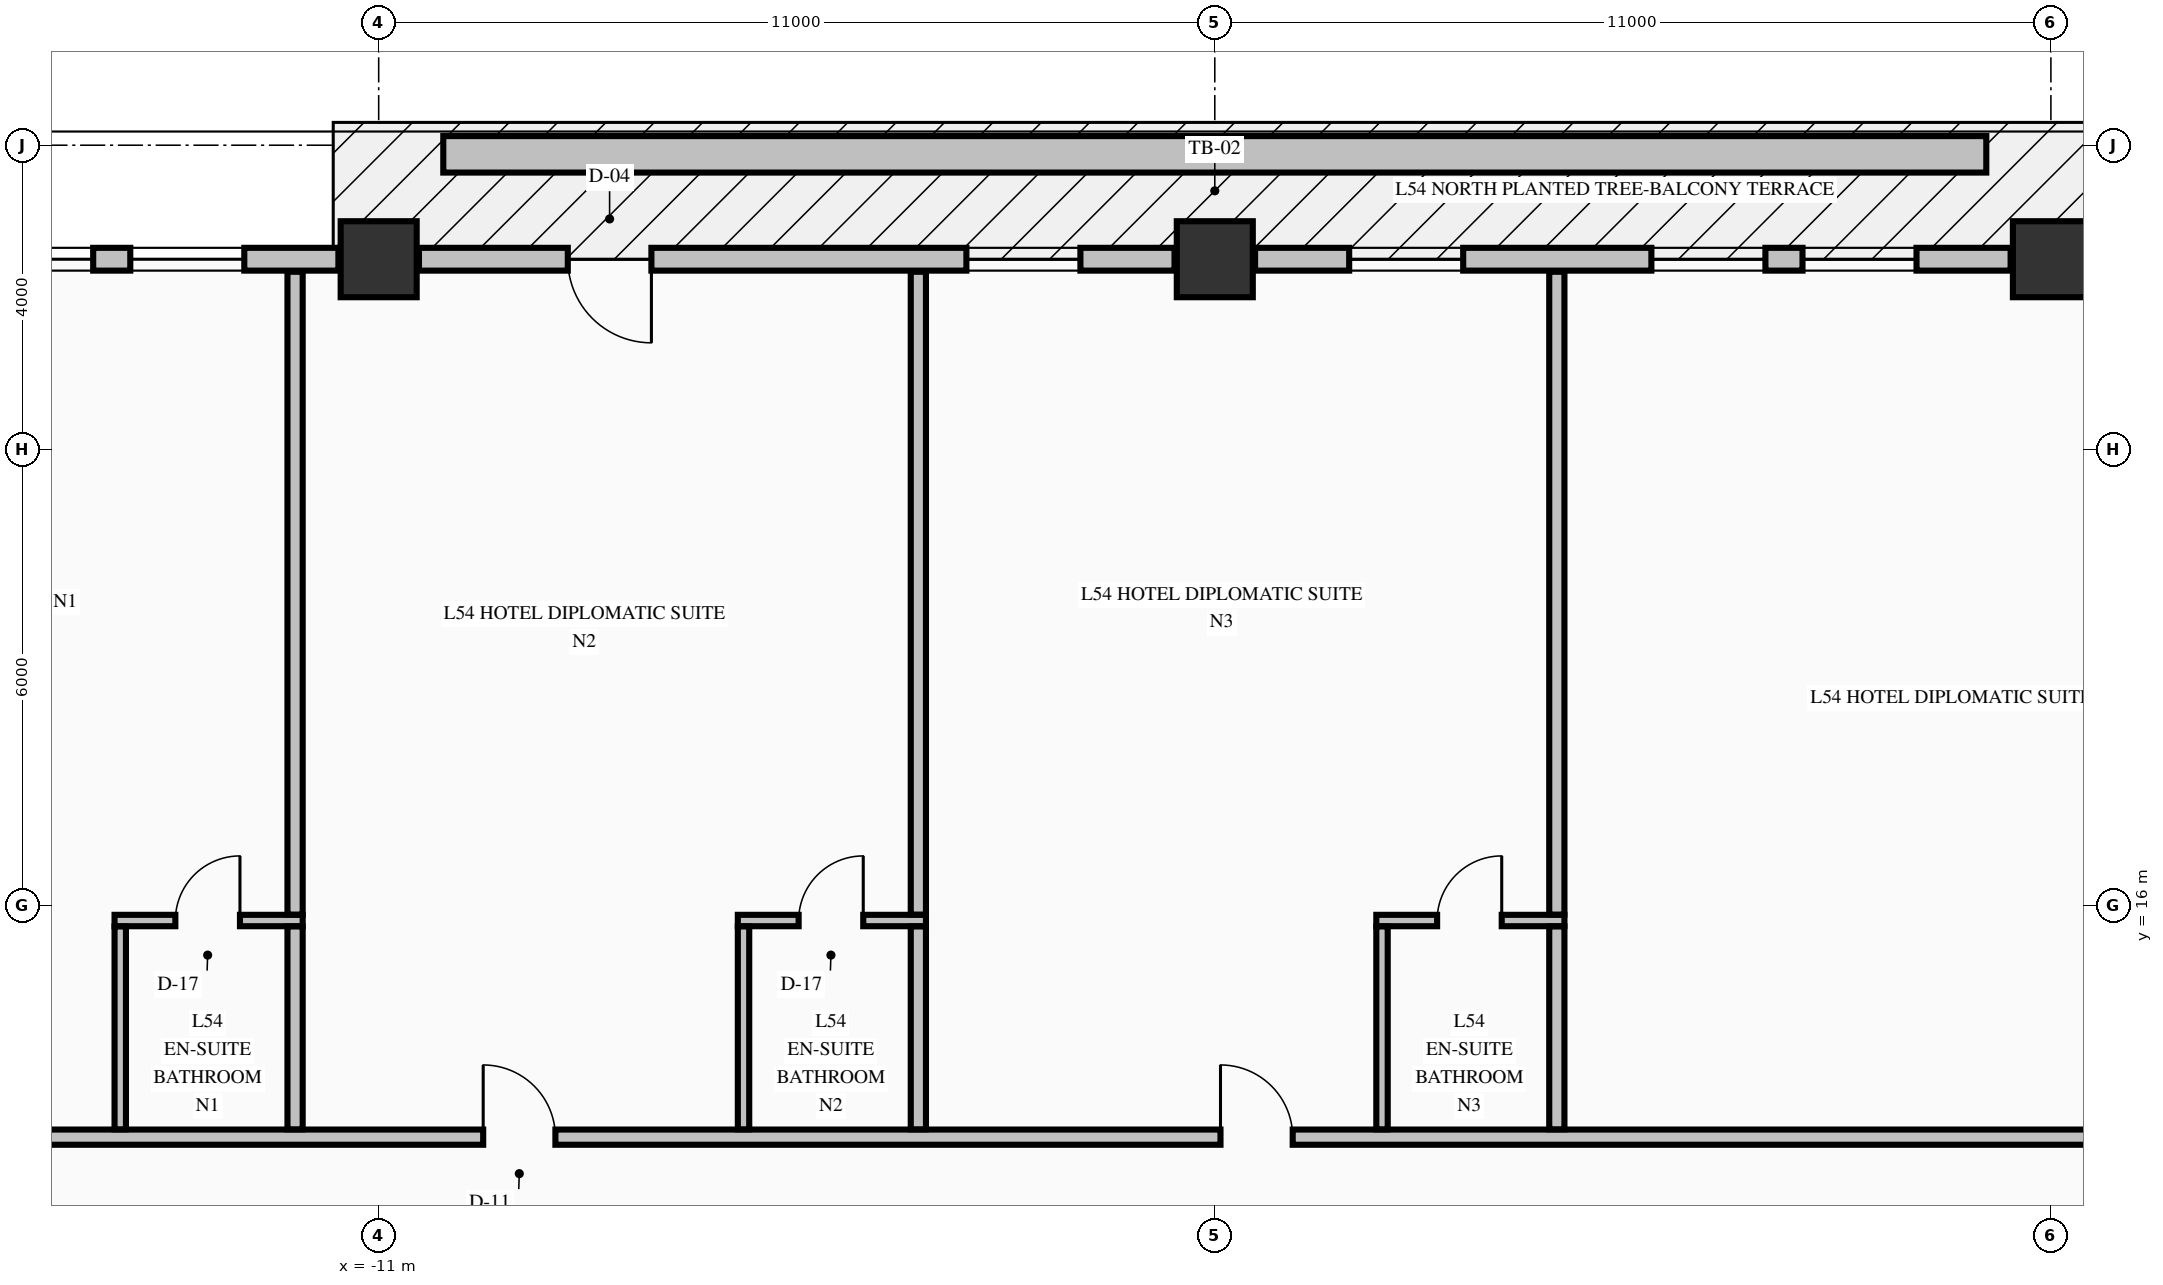
"""IFC4 building model, lengths in metres.
Left out: names, types, materials, properties, quantities, classifications, styles, units other than length and angle.
Written with IfcOpenShell. Run it as: python <this file> out.ifc"""

import sys

from ifc_helpers import new_model, si_unit, direction, frame, frame_2d, origin, origin_2d, place, context, subcontext, project, spatial, rectangle, extrude, element, fill, save


model = new_model("IFC4")
c1 = context("Model", 3, precision=1e-05, world=origin(), true_north=direction((0.0, 1.0)))
c2 = subcontext(c1, "Body", "Model", "MODEL_VIEW")
j1 = project(units=[si_unit("LENGTHUNIT", "METRE"), si_unit("PLANEANGLEUNIT", "RADIAN")], contexts=[c1])
p1 = place(None, origin())
s1 = spatial("IfcSite", under=j1, at=p1, CompositionType="ELEMENT")
p2 = place(p1, origin())
s2 = spatial("IfcBuilding", under=s1, at=p2, CompositionType="ELEMENT")
p3 = place(p2, frame((0.0, 0.0, 208.46)))
s3 = spatial("IfcBuildingStorey", under=s2, at=p3, CompositionType="ELEMENT", Elevation=208.46)
for number, where, z_axis, x_axis in (
    (1, (-11.0, 24.5, -0.25), (0.0, 0.0, 1.0), (1.0, 0.0, 0.0)),
    (2, (0.0, 24.5, -0.25), (0.0, 0.0, 1.0), (1.0, 0.0, 0.0)),
    (3, (11.0, 24.5, -0.25), (0.0, 0.0, 1.0), (1.0, 0.0, 0.0)),
):
    element("IfcColumn", number, at=place(p3, frame(where, z_axis=z_axis, x_axis=x_axis)), inside=s3, PredefinedType="COLUMN", context=c2, shape_type="SweptSolid", body=[
        extrude(rectangle(XDim=1.0, YDim=1.0, at=origin_2d()), origin(), (0.0, 0.0, 1.0), 3.325),
    ])
p4 = place(p3, frame((-11.53, 24.5, 0.0), z_axis=(0.0, 0.0, 1.0), x_axis=(-1.0, 0.0, 0.0)))
e4 = element("IfcWall", 4, at=p4, inside=s3, PredefinedType="STANDARD", context=c2, shape_type="SweptSolid", body=[
    extrude(rectangle(XDim=9.94, YDim=0.3, at=frame_2d((4.97, 0.0))), origin(), (0.0, 0.0, 1.0), 2.467),
])
p5 = place(p4, frame((1.238, 0.0, 0.72)))
e5 = element("IfcOpeningElement", 5, at=p5, cuts=e4, PredefinedType="OPENING", context=c2, shape_type="SweptSolid", body=[
    extrude(rectangle(XDim=1.5, YDim=1.6, at=frame_2d((0.75, 0.8))), frame((0.0, 0.16, 0.0), z_axis=(0.0, -1.0, 0.0), x_axis=(1.0, 0.0, 0.0)), (0.0, 0.0, 1.0), 0.32),
])
p6 = place(p4, frame((3.226, 0.0, 0.72)))
e6 = element("IfcOpeningElement", 6, at=p6, cuts=e4, PredefinedType="OPENING", context=c2, shape_type="SweptSolid", body=[
    extrude(rectangle(XDim=1.5, YDim=1.6, at=frame_2d((0.75, 0.8))), frame((0.0, 0.16, 0.0), z_axis=(0.0, -1.0, 0.0), x_axis=(1.0, 0.0, 0.0)), (0.0, 0.0, 1.0), 0.32),
])
p7 = place(p4, frame((5.214, 0.0, 0.72)))
e7 = element("IfcOpeningElement", 7, at=p7, cuts=e4, PredefinedType="OPENING", context=c2, shape_type="SweptSolid", body=[
    extrude(rectangle(XDim=1.5, YDim=1.6, at=frame_2d((0.75, 0.8))), frame((0.0, 0.16, 0.0), z_axis=(0.0, -1.0, 0.0), x_axis=(1.0, 0.0, 0.0)), (0.0, 0.0, 1.0), 0.32),
])
p8 = place(p3, frame((-0.53, 24.5, 0.0), z_axis=(0.0, 0.0, 1.0), x_axis=(-1.0, 0.0, 0.0)))
e8 = element("IfcWall", 8, at=p8, inside=s3, PredefinedType="STANDARD", context=c2, shape_type="SweptSolid", body=[
    extrude(rectangle(XDim=9.94, YDim=0.3, at=frame_2d((4.97, 0.0))), origin(), (0.0, 0.0, 1.0), 2.467),
])
p9 = place(p8, frame((6.882, 0.0, 0.0)))
e9 = element("IfcOpeningElement", 9, at=p9, cuts=e8, PredefinedType="OPENING", context=c2, shape_type="SweptSolid", body=[
    extrude(rectangle(XDim=1.1, YDim=2.15, at=frame_2d((0.55, 1.075))), frame((0.0, 0.16, 0.0), z_axis=(0.0, -1.0, 0.0), x_axis=(1.0, 0.0, 0.0)), (0.0, 0.0, 1.0), 0.32),
])
p10 = place(p8, frame((1.238, 0.0, 0.72)))
e10 = element("IfcOpeningElement", 10, at=p10, cuts=e8, PredefinedType="OPENING", context=c2, shape_type="SweptSolid", body=[
    extrude(rectangle(XDim=1.5, YDim=1.6, at=frame_2d((0.75, 0.8))), frame((0.0, 0.16, 0.0), z_axis=(0.0, -1.0, 0.0), x_axis=(1.0, 0.0, 0.0)), (0.0, 0.0, 1.0), 0.32),
])
p11 = place(p3, frame((10.47, 24.5, 0.0), z_axis=(0.0, 0.0, 1.0), x_axis=(-1.0, 0.0, 0.0)))
e11 = element("IfcWall", 11, at=p11, inside=s3, PredefinedType="STANDARD", context=c2, shape_type="SweptSolid", body=[
    extrude(rectangle(XDim=9.94, YDim=0.3, at=frame_2d((4.97, 0.0))), origin(), (0.0, 0.0, 1.0), 2.467),
])
p12 = place(p11, frame((1.238, 0.0, 0.72)))
e12 = element("IfcOpeningElement", 12, at=p12, cuts=e11, PredefinedType="OPENING", context=c2, shape_type="SweptSolid", body=[
    extrude(rectangle(XDim=1.5, YDim=1.6, at=frame_2d((0.75, 0.8))), frame((0.0, 0.16, 0.0), z_axis=(0.0, -1.0, 0.0), x_axis=(1.0, 0.0, 0.0)), (0.0, 0.0, 1.0), 0.32),
])
p13 = place(p11, frame((3.226, 0.0, 0.72)))
e13 = element("IfcOpeningElement", 13, at=p13, cuts=e11, PredefinedType="OPENING", context=c2, shape_type="SweptSolid", body=[
    extrude(rectangle(XDim=1.5, YDim=1.6, at=frame_2d((0.75, 0.8))), frame((0.0, 0.16, 0.0), z_axis=(0.0, -1.0, 0.0), x_axis=(1.0, 0.0, 0.0)), (0.0, 0.0, 1.0), 0.32),
])
p14 = place(p11, frame((7.202, 0.0, 0.72)))
e14 = element("IfcOpeningElement", 14, at=p14, cuts=e11, PredefinedType="OPENING", context=c2, shape_type="SweptSolid", body=[
    extrude(rectangle(XDim=1.5, YDim=1.6, at=frame_2d((0.75, 0.8))), frame((0.0, 0.16, 0.0), z_axis=(0.0, -1.0, 0.0), x_axis=(1.0, 0.0, 0.0)), (0.0, 0.0, 1.0), 0.32),
])
p15 = place(p3, frame((-22.1, 12.95, 0.0), z_axis=(0.0, 0.0, 1.0), x_axis=(1.0, 0.0, 0.0)))
e15 = element("IfcWall", 15, at=p15, inside=s3, PredefinedType="PARTITIONING", context=c2, shape_type="SweptSolid", body=[
    extrude(rectangle(XDim=39.2, YDim=0.2, at=frame_2d((19.6, 0.0))), origin(), (0.0, 0.0, 1.0), 3.075),
])
p16 = place(p15, frame((4.525, 0.0, 0.0)))
e16 = element("IfcOpeningElement", 16, at=p16, cuts=e15, PredefinedType="OPENING", context=c2, shape_type="SweptSolid", body=[
    extrude(rectangle(XDim=0.95, YDim=2.15, at=frame_2d((0.475, 1.075))), frame((0.0, 0.11, 0.0), z_axis=(0.0, -1.0, 0.0), x_axis=(1.0, 0.0, 0.0)), (0.0, 0.0, 1.0), 0.22),
])
p17 = place(p15, frame((12.475, 0.0, 0.0)))
e17 = element("IfcOpeningElement", 17, at=p17, cuts=e15, PredefinedType="OPENING", context=c2, shape_type="SweptSolid", body=[
    extrude(rectangle(XDim=0.95, YDim=2.15, at=frame_2d((0.475, 1.075))), frame((0.0, 0.11, 0.0), z_axis=(0.0, -1.0, 0.0), x_axis=(1.0, 0.0, 0.0)), (0.0, 0.0, 1.0), 0.22),
])
p18 = place(p15, frame((22.175, 0.0, 0.0)))
e18 = element("IfcOpeningElement", 18, at=p18, cuts=e15, PredefinedType="OPENING", context=c2, shape_type="SweptSolid", body=[
    extrude(rectangle(XDim=0.95, YDim=2.15, at=frame_2d((0.475, 1.075))), frame((0.0, 0.11, 0.0), z_axis=(0.0, -1.0, 0.0), x_axis=(1.0, 0.0, 0.0)), (0.0, 0.0, 1.0), 0.22),
])
p19 = place(p15, frame((34.675, 0.0, 0.0)))
e19 = element("IfcOpeningElement", 19, at=p19, cuts=e15, PredefinedType="OPENING", context=c2, shape_type="SweptSolid", body=[
    extrude(rectangle(XDim=0.95, YDim=2.15, at=frame_2d((0.475, 1.075))), frame((0.0, 0.11, 0.0), z_axis=(0.0, -1.0, 0.0), x_axis=(1.0, 0.0, 0.0)), (0.0, 0.0, 1.0), 0.22),
])
p20 = place(p3, frame((-14.475, 15.8, 0.0), z_axis=(0.0, 0.0, 1.0), x_axis=(1.0, 0.0, 0.0)))
e20 = element("IfcWall", 20, at=p20, inside=s3, PredefinedType="PARTITIONING", context=c2, shape_type="SweptSolid", body=[
    extrude(rectangle(XDim=2.475, YDim=0.15, at=frame_2d((1.238, 0.0))), origin(), (0.0, 0.0, 1.0), 3.075),
])
p21 = place(p20, frame((0.8, 0.0, 0.0)))
e21 = element("IfcOpeningElement", 21, at=p21, cuts=e20, PredefinedType="OPENING", context=c2, shape_type="SweptSolid", body=[
    extrude(rectangle(XDim=0.85, YDim=2.1, at=frame_2d((0.425, 1.05))), frame((0.0, 0.085, 0.0), z_axis=(0.0, -1.0, 0.0), x_axis=(1.0, 0.0, 0.0)), (0.0, 0.0, 1.0), 0.17),
])
p22 = place(p3, frame((-6.275, 15.8, 0.0), z_axis=(0.0, 0.0, 1.0), x_axis=(1.0, 0.0, 0.0)))
e22 = element("IfcWall", 22, at=p22, inside=s3, PredefinedType="PARTITIONING", context=c2, shape_type="SweptSolid", body=[
    extrude(rectangle(XDim=2.475, YDim=0.15, at=frame_2d((1.237, 0.0))), origin(), (0.0, 0.0, 1.0), 3.075),
])
p23 = place(p22, frame((0.8, 0.0, 0.0)))
e23 = element("IfcOpeningElement", 23, at=p23, cuts=e22, PredefinedType="OPENING", context=c2, shape_type="SweptSolid", body=[
    extrude(rectangle(XDim=0.85, YDim=2.1, at=frame_2d((0.425, 1.05))), frame((0.0, 0.085, 0.0), z_axis=(0.0, -1.0, 0.0), x_axis=(1.0, 0.0, 0.0)), (0.0, 0.0, 1.0), 0.17),
])
p24 = place(p3, frame((2.125, 15.8, 0.0), z_axis=(0.0, 0.0, 1.0), x_axis=(1.0, 0.0, 0.0)))
e24 = element("IfcWall", 24, at=p24, inside=s3, PredefinedType="PARTITIONING", context=c2, shape_type="SweptSolid", body=[
    extrude(rectangle(XDim=2.475, YDim=0.15, at=frame_2d((1.238, 0.0))), origin(), (0.0, 0.0, 1.0), 3.075),
])
p25 = place(p24, frame((0.8, 0.0, 0.0)))
e25 = element("IfcOpeningElement", 25, at=p25, cuts=e24, PredefinedType="OPENING", context=c2, shape_type="SweptSolid", body=[
    extrude(rectangle(XDim=0.85, YDim=2.1, at=frame_2d((0.425, 1.05))), frame((0.0, 0.085, 0.0), z_axis=(0.0, -1.0, 0.0), x_axis=(1.0, 0.0, 0.0)), (0.0, 0.0, 1.0), 0.17),
])
p26 = place(p3, frame((-14.4, 13.053, 0.0), z_axis=(0.0, 0.0, 1.0), x_axis=(0.0, 1.0, 0.0)))
e26 = element("IfcWall", 26, at=p26, inside=s3, PredefinedType="PARTITIONING", context=c2, shape_type="SweptSolid", body=[
    extrude(rectangle(XDim=2.669, YDim=0.15, at=frame_2d((1.334, 0.0))), origin(), (0.0, 0.0, 1.0), 3.075),
])
p27 = place(p3, frame((-12.1, 13.053, 0.0), z_axis=(0.0, 0.0, 1.0), x_axis=(0.0, 1.0, 0.0)))
e27 = element("IfcWall", 27, at=p27, inside=s3, PredefinedType="PARTITIONING", context=c2, shape_type="SweptSolid", body=[
    extrude(rectangle(XDim=2.669, YDim=0.2, at=frame_2d((1.334, 0.0))), origin(), (0.0, 0.0, 1.0), 3.075),
])
p28 = place(p3, frame((-12.1, 15.878, 0.0), z_axis=(0.0, 0.0, 1.0), x_axis=(0.0, 1.0, 0.0)))
e28 = element("IfcWall", 28, at=p28, inside=s3, PredefinedType="PARTITIONING", context=c2, shape_type="SweptSolid", body=[
    extrude(rectangle(XDim=8.457, YDim=0.2, at=frame_2d((4.229, 0.0))), origin(), (0.0, 0.0, 1.0), 3.075),
])
p29 = place(p3, frame((-6.2, 13.053, 0.0), z_axis=(0.0, 0.0, 1.0), x_axis=(0.0, 1.0, 0.0)))
e29 = element("IfcWall", 29, at=p29, inside=s3, PredefinedType="PARTITIONING", context=c2, shape_type="SweptSolid", body=[
    extrude(rectangle(XDim=2.669, YDim=0.15, at=frame_2d((1.334, 0.0))), origin(), (0.0, 0.0, 1.0), 3.075),
])
p30 = place(p3, frame((-3.9, 13.053, 0.0), z_axis=(0.0, 0.0, 1.0), x_axis=(0.0, 1.0, 0.0)))
e30 = element("IfcWall", 30, at=p30, inside=s3, PredefinedType="PARTITIONING", context=c2, shape_type="SweptSolid", body=[
    extrude(rectangle(XDim=2.669, YDim=0.2, at=frame_2d((1.334, 0.0))), origin(), (0.0, 0.0, 1.0), 3.075),
])
p31 = place(p3, frame((-3.9, 15.878, 0.0), z_axis=(0.0, 0.0, 1.0), x_axis=(0.0, 1.0, 0.0)))
e31 = element("IfcWall", 31, at=p31, inside=s3, PredefinedType="PARTITIONING", context=c2, shape_type="SweptSolid", body=[
    extrude(rectangle(XDim=8.457, YDim=0.2, at=frame_2d((4.229, 0.0))), origin(), (0.0, 0.0, 1.0), 3.075),
])
p32 = place(p3, frame((2.2, 13.053, 0.0), z_axis=(0.0, 0.0, 1.0), x_axis=(0.0, 1.0, 0.0)))
e32 = element("IfcWall", 32, at=p32, inside=s3, PredefinedType="PARTITIONING", context=c2, shape_type="SweptSolid", body=[
    extrude(rectangle(XDim=2.669, YDim=0.15, at=frame_2d((1.334, 0.0))), origin(), (0.0, 0.0, 1.0), 3.075),
])
p33 = place(p3, frame((4.5, 13.053, 0.0), z_axis=(0.0, 0.0, 1.0), x_axis=(0.0, 1.0, 0.0)))
e33 = element("IfcWall", 33, at=p33, inside=s3, PredefinedType="PARTITIONING", context=c2, shape_type="SweptSolid", body=[
    extrude(rectangle(XDim=2.669, YDim=0.2, at=frame_2d((1.334, 0.0))), origin(), (0.0, 0.0, 1.0), 3.075),
])
p34 = place(p3, frame((4.5, 15.878, 0.0), z_axis=(0.0, 0.0, 1.0), x_axis=(0.0, 1.0, 0.0)))
e34 = element("IfcWall", 34, at=p34, inside=s3, PredefinedType="PARTITIONING", context=c2, shape_type="SweptSolid", body=[
    extrude(rectangle(XDim=8.457, YDim=0.2, at=frame_2d((4.229, 0.0))), origin(), (0.0, 0.0, 1.0), 3.075),
])
p35 = place(p3, frame((-10.15, 25.88, -0.04), z_axis=(0.0, 0.0, 1.0), x_axis=(1.0, 0.0, 0.0)))
e35 = element("IfcWall", 35, at=p35, inside=s3, PredefinedType="PARAPET", context=c2, shape_type="SweptSolid", body=[
    extrude(rectangle(XDim=20.3, YDim=0.48, at=frame_2d((10.15, 0.0))), origin(), (0.0, 0.0, 1.0), 0.52),
])
p36 = place(p5, origin())
e36 = element("IfcWindow", 36, at=p36, inside=s3, PartitioningType="SINGLE_PANEL", PredefinedType="WINDOW", context=c2, shape_type="SweptSolid", body=[
    extrude(rectangle(XDim=1.5, YDim=1.6, at=frame_2d((0.75, 0.8))), frame((0.0, 0.03, 0.0), z_axis=(0.0, -1.0, 0.0), x_axis=(1.0, 0.0, 0.0)), (0.0, 0.0, 1.0), 0.06),
])
fill(e5, e36)
p37 = place(p6, origin())
e37 = element("IfcWindow", 37, at=p37, inside=s3, PartitioningType="SINGLE_PANEL", PredefinedType="WINDOW", context=c2, shape_type="SweptSolid", body=[
    extrude(rectangle(XDim=1.5, YDim=1.6, at=frame_2d((0.75, 0.8))), frame((0.0, 0.03, 0.0), z_axis=(0.0, -1.0, 0.0), x_axis=(1.0, 0.0, 0.0)), (0.0, 0.0, 1.0), 0.06),
])
fill(e6, e37)
p38 = place(p9, origin())
e38 = element("IfcDoor", 38, at=p38, inside=s3, OperationType="SINGLE_SWING_LEFT", PredefinedType="DOOR", context=c2, shape_type="SweptSolid", body=[
    extrude(rectangle(XDim=1.1, YDim=2.15, at=frame_2d((0.55, 1.075))), frame((0.0, 0.025, 0.0), z_axis=(0.0, -1.0, 0.0), x_axis=(1.0, 0.0, 0.0)), (0.0, 0.0, 1.0), 0.05),
])
fill(e9, e38)
p39 = place(p10, origin())
e39 = element("IfcWindow", 39, at=p39, inside=s3, PartitioningType="SINGLE_PANEL", PredefinedType="WINDOW", context=c2, shape_type="SweptSolid", body=[
    extrude(rectangle(XDim=1.5, YDim=1.6, at=frame_2d((0.75, 0.8))), frame((0.0, 0.03, 0.0), z_axis=(0.0, -1.0, 0.0), x_axis=(1.0, 0.0, 0.0)), (0.0, 0.0, 1.0), 0.06),
])
fill(e10, e39)
p40 = place(p12, origin())
e40 = element("IfcWindow", 40, at=p40, inside=s3, PartitioningType="SINGLE_PANEL", PredefinedType="WINDOW", context=c2, shape_type="SweptSolid", body=[
    extrude(rectangle(XDim=1.5, YDim=1.6, at=frame_2d((0.75, 0.8))), frame((0.0, 0.03, 0.0), z_axis=(0.0, -1.0, 0.0), x_axis=(1.0, 0.0, 0.0)), (0.0, 0.0, 1.0), 0.06),
])
fill(e12, e40)
p41 = place(p13, origin())
e41 = element("IfcWindow", 41, at=p41, inside=s3, PartitioningType="SINGLE_PANEL", PredefinedType="WINDOW", context=c2, shape_type="SweptSolid", body=[
    extrude(rectangle(XDim=1.5, YDim=1.6, at=frame_2d((0.75, 0.8))), frame((0.0, 0.03, 0.0), z_axis=(0.0, -1.0, 0.0), x_axis=(1.0, 0.0, 0.0)), (0.0, 0.0, 1.0), 0.06),
])
fill(e13, e41)
p42 = place(p14, origin())
e42 = element("IfcWindow", 42, at=p42, inside=s3, PartitioningType="SINGLE_PANEL", PredefinedType="WINDOW", context=c2, shape_type="SweptSolid", body=[
    extrude(rectangle(XDim=1.5, YDim=1.6, at=frame_2d((0.75, 0.8))), frame((0.0, 0.03, 0.0), z_axis=(0.0, -1.0, 0.0), x_axis=(1.0, 0.0, 0.0)), (0.0, 0.0, 1.0), 0.06),
])
fill(e14, e42)
p43 = place(p21, origin())
e43 = element("IfcDoor", 43, at=p43, inside=s3, OperationType="SINGLE_SWING_RIGHT", PredefinedType="DOOR", context=c2, shape_type="SweptSolid", body=[
    extrude(rectangle(XDim=0.85, YDim=2.1, at=frame_2d((0.425, 1.05))), frame((0.0, 0.025, 0.0), z_axis=(0.0, -1.0, 0.0), x_axis=(1.0, 0.0, 0.0)), (0.0, 0.0, 1.0), 0.05),
])
fill(e21, e43)
p44 = place(p17, origin())
e44 = element("IfcDoor", 44, at=p44, inside=s3, OperationType="SINGLE_SWING_LEFT", PredefinedType="DOOR", context=c2, shape_type="SweptSolid", body=[
    extrude(rectangle(XDim=0.95, YDim=2.15, at=frame_2d((0.475, 1.075))), frame((0.0, 0.025, 0.0), z_axis=(0.0, -1.0, 0.0), x_axis=(1.0, 0.0, 0.0)), (0.0, 0.0, 1.0), 0.05),
])
fill(e17, e44)
p45 = place(p23, origin())
e45 = element("IfcDoor", 45, at=p45, inside=s3, OperationType="SINGLE_SWING_RIGHT", PredefinedType="DOOR", context=c2, shape_type="SweptSolid", body=[
    extrude(rectangle(XDim=0.85, YDim=2.1, at=frame_2d((0.425, 1.05))), frame((0.0, 0.025, 0.0), z_axis=(0.0, -1.0, 0.0), x_axis=(1.0, 0.0, 0.0)), (0.0, 0.0, 1.0), 0.05),
])
fill(e23, e45)
p46 = place(p18, origin())
e46 = element("IfcDoor", 46, at=p46, inside=s3, OperationType="SINGLE_SWING_LEFT", PredefinedType="DOOR", context=c2, shape_type="SweptSolid", body=[
    extrude(rectangle(XDim=0.95, YDim=2.15, at=frame_2d((0.475, 1.075))), frame((0.0, 0.025, 0.0), z_axis=(0.0, -1.0, 0.0), x_axis=(1.0, 0.0, 0.0)), (0.0, 0.0, 1.0), 0.05),
])
fill(e18, e46)
p47 = place(p25, origin())
e47 = element("IfcDoor", 47, at=p47, inside=s3, OperationType="SINGLE_SWING_RIGHT", PredefinedType="DOOR", context=c2, shape_type="SweptSolid", body=[
    extrude(rectangle(XDim=0.85, YDim=2.1, at=frame_2d((0.425, 1.05))), frame((0.0, 0.025, 0.0), z_axis=(0.0, -1.0, 0.0), x_axis=(1.0, 0.0, 0.0)), (0.0, 0.0, 1.0), 0.05),
])
fill(e25, e47)
save(model, sys.argv[1])
